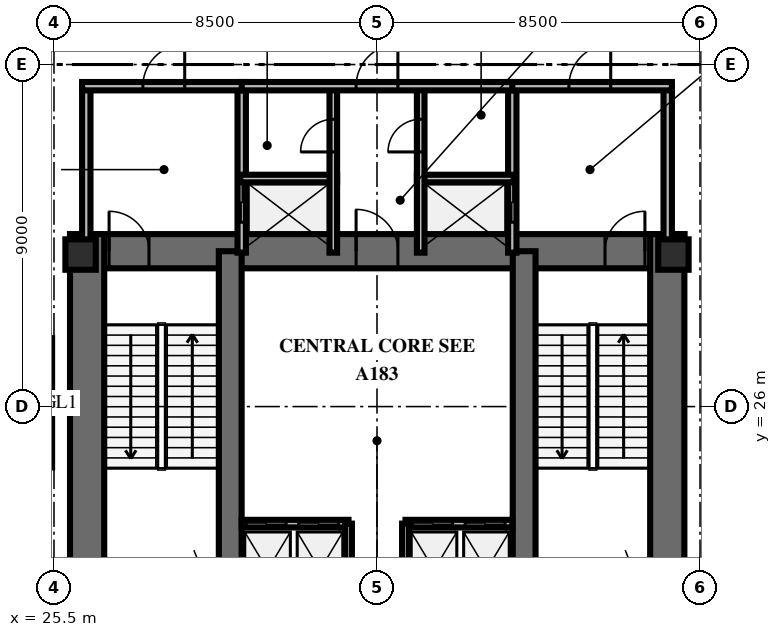
"""IFC4 building model, lengths in metres.
Left out: names, types, materials, properties, quantities, classifications, styles, units other than length and angle.
Written with IfcOpenShell. Run it as: python <this file> out.ifc"""

import sys

from ifc_helpers import new_model, si_unit, direction, frame, frame_2d, origin, origin_2d, place, context, subcontext, project, spatial, rectangle, extrude, element, fill, save


model = new_model("IFC4")
c1 = context("Model", 3, precision=1e-05, world=origin(), true_north=direction((0.0, 1.0)))
c2 = subcontext(c1, "Body", "Model", "MODEL_VIEW")
j1 = project(units=[si_unit("LENGTHUNIT", "METRE"), si_unit("PLANEANGLEUNIT", "RADIAN")], contexts=[c1])
p1 = place(None, origin())
s1 = spatial("IfcSite", under=j1, at=p1, CompositionType="ELEMENT")
p2 = place(p1, origin())
s2 = spatial("IfcBuilding", under=s1, at=p2, CompositionType="ELEMENT")
p3 = place(p2, frame((0.0, 0.0, -4.8)))
s3 = spatial("IfcBuildingStorey", under=s2, at=p3, CompositionType="ELEMENT", Elevation=-4.8)
p4 = place(p3, frame((25.922, 30.088, 0.0), z_axis=(0.0, 0.0, 1.0), x_axis=(1.0, 0.0, 0.0)))
e1 = element("IfcWall", 1, at=p4, inside=s3, PredefinedType="SHEAR", context=c2, shape_type="SweptSolid", body=[
    extrude(rectangle(XDim=16.166, YDim=0.9, at=frame_2d((8.083, 0.0))), origin(), (0.0, 0.0, 1.0), 4.8),
])
p5 = place(p4, frame((1.028, 0.0, 0.0)))
e2 = element("IfcOpeningElement", 2, at=p5, cuts=e1, PredefinedType="OPENING", context=c2, shape_type="SweptSolid", body=[
    extrude(rectangle(XDim=1.05, YDim=2.15, at=frame_2d((0.525, 1.075))), frame((0.0, 0.46, 0.0), z_axis=(0.0, -1.0, 0.0), x_axis=(1.0, 0.0, 0.0)), (0.0, 0.0, 1.0), 0.92),
])
p6 = place(p4, frame((14.078, 0.0, 0.0)))
e3 = element("IfcOpeningElement", 3, at=p6, cuts=e1, PredefinedType="OPENING", context=c2, shape_type="SweptSolid", body=[
    extrude(rectangle(XDim=1.05, YDim=2.15, at=frame_2d((0.525, 1.075))), frame((0.0, 0.46, 0.0), z_axis=(0.0, -1.0, 0.0), x_axis=(1.0, 0.0, 0.0)), (0.0, 0.0, 1.0), 0.92),
])
p7 = place(p4, frame((7.528, 0.0, 0.0)))
e4 = element("IfcOpeningElement", 4, at=p7, cuts=e1, PredefinedType="OPENING", context=c2, shape_type="SweptSolid", body=[
    extrude(rectangle(XDim=1.1, YDim=2.15, at=frame_2d((0.55, 1.075))), frame((0.0, 0.46, 0.0), z_axis=(0.0, -1.0, 0.0), x_axis=(1.0, 0.0, 0.0)), (0.0, 0.0, 1.0), 0.92),
])
for number, where, z_axis, x_axis in (
    (5, (26.372, 19.662, 0.0), (0.0, 0.0, 1.0), (0.0, 1.0, 0.0)),
    (6, (41.638, 19.662, 0.0), (0.0, 0.0, 1.0), (0.0, 1.0, 0.0)),
):
    element("IfcWall", number, at=place(p3, frame(where, z_axis=z_axis, x_axis=x_axis)), inside=s3, PredefinedType="SHEAR", context=c2, shape_type="SweptSolid", body=[
        extrude(rectangle(XDim=10.876, YDim=0.9, at=frame_2d((5.438, 0.0))), origin(), (0.0, 0.0, 1.0), 4.8),
    ])
for number, where, z_axis, x_axis in (
    (7, (30.138, 20.112, 0.0), (0.0, 0.0, 1.0), (0.0, 1.0, 0.0)),
    (8, (37.872, 20.112, 0.0), (0.0, 0.0, 1.0), (0.0, 1.0, 0.0)),
):
    element("IfcWall", number, at=place(p3, frame(where, z_axis=z_axis, x_axis=x_axis)), inside=s3, PredefinedType="SHEAR", context=c2, shape_type="SweptSolid", body=[
        extrude(rectangle(XDim=9.976, YDim=0.6, at=frame_2d((4.988, 0.0))), origin(), (0.0, 0.0, 1.0), 4.8),
    ])
for number, where, z_axis, x_axis in (
    (9, (26.2, 30.0, 0.0), (0.0, 0.0, 1.0), (1.0, 0.0, 0.0)),
    (10, (41.8, 30.0, 0.0), (0.0, 0.0, 1.0), (1.0, 0.0, 0.0)),
):
    element("IfcColumn", number, at=place(p3, frame(where, z_axis=z_axis, x_axis=x_axis)), inside=s3, PredefinedType="PILASTER", context=c2, shape_type="SweptSolid", body=[
        extrude(rectangle(XDim=0.8, YDim=0.8, at=origin_2d()), origin(), (0.0, 0.0, 1.0), 4.8),
    ])
p8 = place(p3, frame((26.35, 30.05, 0.0), z_axis=(0.0, 0.0, 1.0), x_axis=(0.0, 1.0, 0.0)))
e11 = element("IfcWall", 11, at=p8, inside=s3, PredefinedType="SOLIDWALL", context=c2, shape_type="SweptSolid", body=[
    extrude(rectangle(XDim=4.38, YDim=0.22, at=frame_2d((2.19, 0.0))), origin(), (0.0, 0.0, 1.0), 3.56),
])
p9 = place(p3, frame((30.44, 30.05, 0.0), z_axis=(0.0, 0.0, 1.0), x_axis=(0.0, 1.0, 0.0)))
e12 = element("IfcWall", 12, at=p9, inside=s3, PredefinedType="SOLIDWALL", context=c2, shape_type="SweptSolid", body=[
    extrude(rectangle(XDim=4.38, YDim=0.22, at=frame_2d((2.19, 0.0))), origin(), (0.0, 0.0, 1.0), 3.56),
])
p10 = place(p9, frame((0.8, 0.0, 0.0)))
e13 = element("IfcOpeningElement", 13, at=p10, cuts=e12, PredefinedType="OPENING", context=c2, shape_type="SweptSolid", body=[
    extrude(rectangle(XDim=1.05, YDim=2.1, at=frame_2d((0.525, 1.05))), frame((0.0, 0.12, 0.0), z_axis=(0.0, -1.0, 0.0), x_axis=(1.0, 0.0, 0.0)), (0.0, 0.0, 1.0), 0.24),
])
p11 = place(p3, frame((26.24, 34.43, 0.0), z_axis=(0.0, 0.0, 1.0), x_axis=(1.0, 0.0, 0.0)))
e14 = element("IfcWall", 14, at=p11, inside=s3, PredefinedType="SOLIDWALL", context=c2, shape_type="SweptSolid", body=[
    extrude(rectangle(XDim=4.31, YDim=0.22, at=frame_2d((2.155, 0.0))), origin(), (0.0, 0.0, 1.0), 3.56),
])
p12 = place(p11, frame((1.6, 0.0, 0.0)))
e15 = element("IfcOpeningElement", 15, at=p12, cuts=e14, PredefinedType="OPENING", context=c2, shape_type="SweptSolid", body=[
    extrude(rectangle(XDim=1.1, YDim=2.15, at=frame_2d((0.55, 1.075))), frame((0.0, 0.12, 0.0), z_axis=(0.0, -1.0, 0.0), x_axis=(1.0, 0.0, 0.0)), (0.0, 0.0, 1.0), 0.24),
])
p13 = place(p3, frame((30.4, 32.0, 0.0), z_axis=(0.0, 0.0, 1.0), x_axis=(1.0, 0.0, 0.0)))
e16 = element("IfcWall", 16, at=p13, inside=s3, PredefinedType="SOLIDWALL", context=c2, shape_type="SweptSolid", body=[
    extrude(rectangle(XDim=2.55, YDim=0.2, at=frame_2d((1.275, 0.0))), origin(), (0.0, 0.0, 1.0), 3.56),
])
p14 = place(p3, frame((32.85, 30.05, 0.0), z_axis=(0.0, 0.0, 1.0), x_axis=(0.0, 1.0, 0.0)))
e17 = element("IfcWall", 17, at=p14, inside=s3, PredefinedType="SOLIDWALL", context=c2, shape_type="SweptSolid", body=[
    extrude(rectangle(XDim=4.38, YDim=0.2, at=frame_2d((2.19, 0.0))), origin(), (0.0, 0.0, 1.0), 3.56),
])
p15 = place(p14, frame((2.65, 0.0, 0.0)))
e18 = element("IfcOpeningElement", 18, at=p15, cuts=e17, PredefinedType="OPENING", context=c2, shape_type="SweptSolid", body=[
    extrude(rectangle(XDim=0.86, YDim=2.05, at=frame_2d((0.43, 1.025))), frame((0.0, 0.11, 0.0), z_axis=(0.0, -1.0, 0.0), x_axis=(1.0, 0.0, 0.0)), (0.0, 0.0, 1.0), 0.22),
])
p16 = place(p3, frame((37.56, 30.05, 0.0), z_axis=(0.0, 0.0, 1.0), x_axis=(0.0, 1.0, 0.0)))
e19 = element("IfcWall", 19, at=p16, inside=s3, PredefinedType="SOLIDWALL", context=c2, shape_type="SweptSolid", body=[
    extrude(rectangle(XDim=4.38, YDim=0.22, at=frame_2d((2.19, 0.0))), origin(), (0.0, 0.0, 1.0), 3.56),
])
p17 = place(p16, frame((0.8, 0.0, 0.0)))
e20 = element("IfcOpeningElement", 20, at=p17, cuts=e19, PredefinedType="OPENING", context=c2, shape_type="SweptSolid", body=[
    extrude(rectangle(XDim=1.05, YDim=2.1, at=frame_2d((0.525, 1.05))), frame((0.0, 0.12, 0.0), z_axis=(0.0, -1.0, 0.0), x_axis=(1.0, 0.0, 0.0)), (0.0, 0.0, 1.0), 0.24),
])
p18 = place(p3, frame((41.65, 30.05, 0.0), z_axis=(0.0, 0.0, 1.0), x_axis=(0.0, 1.0, 0.0)))
e21 = element("IfcWall", 21, at=p18, inside=s3, PredefinedType="SOLIDWALL", context=c2, shape_type="SweptSolid", body=[
    extrude(rectangle(XDim=4.38, YDim=0.22, at=frame_2d((2.19, 0.0))), origin(), (0.0, 0.0, 1.0), 3.56),
])
p19 = place(p3, frame((37.45, 34.43, 0.0), z_axis=(0.0, 0.0, 1.0), x_axis=(1.0, 0.0, 0.0)))
e22 = element("IfcWall", 22, at=p19, inside=s3, PredefinedType="SOLIDWALL", context=c2, shape_type="SweptSolid", body=[
    extrude(rectangle(XDim=4.31, YDim=0.22, at=frame_2d((2.155, 0.0))), origin(), (0.0, 0.0, 1.0), 3.56),
])
p20 = place(p19, frame((1.6, 0.0, 0.0)))
e23 = element("IfcOpeningElement", 23, at=p20, cuts=e22, PredefinedType="OPENING", context=c2, shape_type="SweptSolid", body=[
    extrude(rectangle(XDim=1.1, YDim=2.15, at=frame_2d((0.55, 1.075))), frame((0.0, 0.12, 0.0), z_axis=(0.0, -1.0, 0.0), x_axis=(1.0, 0.0, 0.0)), (0.0, 0.0, 1.0), 0.24),
])
p21 = place(p3, frame((35.05, 32.0, 0.0), z_axis=(0.0, 0.0, 1.0), x_axis=(1.0, 0.0, 0.0)))
e24 = element("IfcWall", 24, at=p21, inside=s3, PredefinedType="SOLIDWALL", context=c2, shape_type="SweptSolid", body=[
    extrude(rectangle(XDim=2.55, YDim=0.2, at=frame_2d((1.275, 0.0))), origin(), (0.0, 0.0, 1.0), 3.56),
])
p22 = place(p3, frame((35.15, 30.05, 0.0), z_axis=(0.0, 0.0, 1.0), x_axis=(0.0, 1.0, 0.0)))
e25 = element("IfcWall", 25, at=p22, inside=s3, PredefinedType="SOLIDWALL", context=c2, shape_type="SweptSolid", body=[
    extrude(rectangle(XDim=4.38, YDim=0.2, at=frame_2d((2.19, 0.0))), origin(), (0.0, 0.0, 1.0), 3.56),
])
p23 = place(p22, frame((2.65, 0.0, 0.0)))
e26 = element("IfcOpeningElement", 26, at=p23, cuts=e25, PredefinedType="OPENING", context=c2, shape_type="SweptSolid", body=[
    extrude(rectangle(XDim=0.86, YDim=2.05, at=frame_2d((0.43, 1.025))), frame((0.0, 0.11, 0.0), z_axis=(0.0, -1.0, 0.0), x_axis=(1.0, 0.0, 0.0)), (0.0, 0.0, 1.0), 0.22),
])
p24 = place(p3, frame((30.44, 34.43, 0.0), z_axis=(0.0, 0.0, 1.0), x_axis=(1.0, 0.0, 0.0)))
e27 = element("IfcWall", 27, at=p24, inside=s3, PredefinedType="SOLIDWALL", context=c2, shape_type="SweptSolid", body=[
    extrude(rectangle(XDim=7.12, YDim=0.22, at=frame_2d((3.56, 0.0))), origin(), (0.0, 0.0, 1.0), 3.56),
])
p25 = place(p24, frame((3.01, 0.0, 0.0)))
e28 = element("IfcOpeningElement", 28, at=p25, cuts=e27, PredefinedType="OPENING", context=c2, shape_type="SweptSolid", body=[
    extrude(rectangle(XDim=1.1, YDim=2.15, at=frame_2d((0.55, 1.075))), frame((0.0, 0.12, 0.0), z_axis=(0.0, -1.0, 0.0), x_axis=(1.0, 0.0, 0.0)), (0.0, 0.0, 1.0), 0.24),
])
p26 = place(p3, frame((30.44, 22.92, 0.0), z_axis=(0.0, 0.0, 1.0), x_axis=(1.0, 0.0, 0.0)))
e29 = element("IfcWall", 29, at=p26, inside=s3, PredefinedType="SOLIDWALL", context=c2, shape_type="SweptSolid", body=[
    extrude(rectangle(XDim=2.81, YDim=0.2, at=frame_2d((1.405, 0.0))), origin(), (0.0, 0.0, 1.0), 3.56),
])
p27 = place(p26, frame((0.12, 0.0, 0.0)))
e30 = element("IfcOpeningElement", 30, at=p27, cuts=e29, PredefinedType="OPENING", context=c2, shape_type="SweptSolid", body=[
    extrude(rectangle(XDim=1.05, YDim=2.1, at=frame_2d((0.525, 1.05))), frame((0.0, 0.11, 0.0), z_axis=(0.0, -1.0, 0.0), x_axis=(1.0, 0.0, 0.0)), (0.0, 0.0, 1.0), 0.22),
])
p28 = place(p26, frame((1.5, 0.0, 0.0)))
e31 = element("IfcOpeningElement", 31, at=p28, cuts=e29, PredefinedType="OPENING", context=c2, shape_type="SweptSolid", body=[
    extrude(rectangle(XDim=1.05, YDim=2.1, at=frame_2d((0.525, 1.05))), frame((0.0, 0.11, 0.0), z_axis=(0.0, -1.0, 0.0), x_axis=(1.0, 0.0, 0.0)), (0.0, 0.0, 1.0), 0.22),
])
p29 = place(p3, frame((33.25, 20.5, 0.0), z_axis=(0.0, 0.0, 1.0), x_axis=(0.0, 1.0, 0.0)))
e32 = element("IfcWall", 32, at=p29, inside=s3, PredefinedType="SOLIDWALL", context=c2, shape_type="SweptSolid", body=[
    extrude(rectangle(XDim=2.42, YDim=0.18, at=frame_2d((1.21, 0.0))), origin(), (0.0, 0.0, 1.0), 3.56),
])
p30 = place(p3, frame((34.75, 22.92, 0.0), z_axis=(0.0, 0.0, 1.0), x_axis=(1.0, 0.0, 0.0)))
e33 = element("IfcWall", 33, at=p30, inside=s3, PredefinedType="SOLIDWALL", context=c2, shape_type="SweptSolid", body=[
    extrude(rectangle(XDim=2.81, YDim=0.2, at=frame_2d((1.405, 0.0))), origin(), (0.0, 0.0, 1.0), 3.56),
])
p31 = place(p30, frame((0.19, 0.0, 0.0)))
e34 = element("IfcOpeningElement", 34, at=p31, cuts=e33, PredefinedType="OPENING", context=c2, shape_type="SweptSolid", body=[
    extrude(rectangle(XDim=1.05, YDim=2.1, at=frame_2d((0.525, 1.05))), frame((0.0, 0.11, 0.0), z_axis=(0.0, -1.0, 0.0), x_axis=(1.0, 0.0, 0.0)), (0.0, 0.0, 1.0), 0.22),
])
p32 = place(p30, frame((1.57, 0.0, 0.0)))
e35 = element("IfcOpeningElement", 35, at=p32, cuts=e33, PredefinedType="OPENING", context=c2, shape_type="SweptSolid", body=[
    extrude(rectangle(XDim=1.05, YDim=2.1, at=frame_2d((0.525, 1.05))), frame((0.0, 0.11, 0.0), z_axis=(0.0, -1.0, 0.0), x_axis=(1.0, 0.0, 0.0)), (0.0, 0.0, 1.0), 0.22),
])
p33 = place(p3, frame((34.75, 20.5, 0.0), z_axis=(0.0, 0.0, 1.0), x_axis=(0.0, 1.0, 0.0)))
e36 = element("IfcWall", 36, at=p33, inside=s3, PredefinedType="SOLIDWALL", context=c2, shape_type="SweptSolid", body=[
    extrude(rectangle(XDim=2.42, YDim=0.18, at=frame_2d((1.21, 0.0))), origin(), (0.0, 0.0, 1.0), 3.56),
])
p34 = place(p5, origin())
e37 = element("IfcDoor", 37, at=p34, inside=s3, OperationType="SINGLE_SWING_LEFT", PredefinedType="DOOR", context=c2, shape_type="SweptSolid", body=[
    extrude(rectangle(XDim=1.05, YDim=2.15, at=frame_2d((0.525, 1.075))), frame((0.0, 0.025, 0.0), z_axis=(0.0, -1.0, 0.0), x_axis=(1.0, 0.0, 0.0)), (0.0, 0.0, 1.0), 0.05),
])
fill(e2, e37)
p35 = place(p6, origin())
e38 = element("IfcDoor", 38, at=p35, inside=s3, OperationType="SINGLE_SWING_RIGHT", PredefinedType="DOOR", context=c2, shape_type="SweptSolid", body=[
    extrude(rectangle(XDim=1.05, YDim=2.15, at=frame_2d((0.525, 1.075))), frame((0.0, 0.025, 0.0), z_axis=(0.0, -1.0, 0.0), x_axis=(1.0, 0.0, 0.0)), (0.0, 0.0, 1.0), 0.05),
])
fill(e3, e38)
p36 = place(p7, origin())
e39 = element("IfcDoor", 39, at=p36, inside=s3, OperationType="SINGLE_SWING_LEFT", PredefinedType="DOOR", context=c2, shape_type="SweptSolid", body=[
    extrude(rectangle(XDim=1.1, YDim=2.15, at=frame_2d((0.55, 1.075))), frame((0.0, 0.025, 0.0), z_axis=(0.0, -1.0, 0.0), x_axis=(1.0, 0.0, 0.0)), (0.0, 0.0, 1.0), 0.05),
])
fill(e4, e39)
p37 = place(p12, origin())
e40 = element("IfcDoor", 40, at=p37, inside=s3, OperationType="SINGLE_SWING_RIGHT", PredefinedType="DOOR", context=c2, shape_type="SweptSolid", body=[
    extrude(rectangle(XDim=1.1, YDim=2.15, at=frame_2d((0.55, 1.075))), frame((0.0, 0.025, 0.0), z_axis=(0.0, -1.0, 0.0), x_axis=(1.0, 0.0, 0.0)), (0.0, 0.0, 1.0), 0.05),
])
fill(e15, e40)
p38 = place(p10, origin())
e41 = element("IfcDoor", 41, at=p38, inside=s3, OperationType="DOUBLE_DOOR_SLIDING", PredefinedType="USERDEFINED", context=c2, shape_type="SweptSolid", body=[
    extrude(rectangle(XDim=1.05, YDim=2.1, at=frame_2d((0.525, 1.05))), frame((0.0, 0.025, 0.0), z_axis=(0.0, -1.0, 0.0), x_axis=(1.0, 0.0, 0.0)), (0.0, 0.0, 1.0), 0.05),
])
fill(e13, e41)
p39 = place(p15, origin())
e42 = element("IfcDoor", 42, at=p39, inside=s3, OperationType="SINGLE_SWING_LEFT", PredefinedType="TRAPDOOR", context=c2, shape_type="SweptSolid", body=[
    extrude(rectangle(XDim=0.86, YDim=2.05, at=frame_2d((0.43, 1.025))), frame((0.0, 0.025, 0.0), z_axis=(0.0, -1.0, 0.0), x_axis=(1.0, 0.0, 0.0)), (0.0, 0.0, 1.0), 0.05),
])
fill(e18, e42)
p40 = place(p20, origin())
e43 = element("IfcDoor", 43, at=p40, inside=s3, OperationType="SINGLE_SWING_RIGHT", PredefinedType="DOOR", context=c2, shape_type="SweptSolid", body=[
    extrude(rectangle(XDim=1.1, YDim=2.15, at=frame_2d((0.55, 1.075))), frame((0.0, 0.025, 0.0), z_axis=(0.0, -1.0, 0.0), x_axis=(1.0, 0.0, 0.0)), (0.0, 0.0, 1.0), 0.05),
])
fill(e23, e43)
p41 = place(p17, origin())
e44 = element("IfcDoor", 44, at=p41, inside=s3, OperationType="DOUBLE_DOOR_SLIDING", PredefinedType="USERDEFINED", context=c2, shape_type="SweptSolid", body=[
    extrude(rectangle(XDim=1.05, YDim=2.1, at=frame_2d((0.525, 1.05))), frame((0.0, 0.025, 0.0), z_axis=(0.0, -1.0, 0.0), x_axis=(1.0, 0.0, 0.0)), (0.0, 0.0, 1.0), 0.05),
])
fill(e20, e44)
p42 = place(p23, origin())
e45 = element("IfcDoor", 45, at=p42, inside=s3, OperationType="SINGLE_SWING_LEFT", PredefinedType="TRAPDOOR", context=c2, shape_type="SweptSolid", body=[
    extrude(rectangle(XDim=0.86, YDim=2.05, at=frame_2d((0.43, 1.025))), frame((0.0, 0.025, 0.0), z_axis=(0.0, -1.0, 0.0), x_axis=(1.0, 0.0, 0.0)), (0.0, 0.0, 1.0), 0.05),
])
fill(e26, e45)
p43 = place(p25, origin())
e46 = element("IfcDoor", 46, at=p43, inside=s3, OperationType="SINGLE_SWING_RIGHT", PredefinedType="DOOR", context=c2, shape_type="SweptSolid", body=[
    extrude(rectangle(XDim=1.1, YDim=2.15, at=frame_2d((0.55, 1.075))), frame((0.0, 0.025, 0.0), z_axis=(0.0, -1.0, 0.0), x_axis=(1.0, 0.0, 0.0)), (0.0, 0.0, 1.0), 0.05),
])
fill(e28, e46)
p44 = place(p27, origin())
e47 = element("IfcDoor", 47, at=p44, inside=s3, OperationType="DOUBLE_DOOR_SLIDING", PredefinedType="USERDEFINED", context=c2, shape_type="SweptSolid", body=[
    extrude(rectangle(XDim=1.05, YDim=2.1, at=frame_2d((0.525, 1.05))), frame((0.0, 0.025, 0.0), z_axis=(0.0, -1.0, 0.0), x_axis=(1.0, 0.0, 0.0)), (0.0, 0.0, 1.0), 0.05),
])
fill(e30, e47)
p45 = place(p28, origin())
e48 = element("IfcDoor", 48, at=p45, inside=s3, OperationType="DOUBLE_DOOR_SLIDING", PredefinedType="USERDEFINED", context=c2, shape_type="SweptSolid", body=[
    extrude(rectangle(XDim=1.05, YDim=2.1, at=frame_2d((0.525, 1.05))), frame((0.0, 0.025, 0.0), z_axis=(0.0, -1.0, 0.0), x_axis=(1.0, 0.0, 0.0)), (0.0, 0.0, 1.0), 0.05),
])
fill(e31, e48)
p46 = place(p31, origin())
e49 = element("IfcDoor", 49, at=p46, inside=s3, OperationType="DOUBLE_DOOR_SLIDING", PredefinedType="USERDEFINED", context=c2, shape_type="SweptSolid", body=[
    extrude(rectangle(XDim=1.05, YDim=2.1, at=frame_2d((0.525, 1.05))), frame((0.0, 0.025, 0.0), z_axis=(0.0, -1.0, 0.0), x_axis=(1.0, 0.0, 0.0)), (0.0, 0.0, 1.0), 0.05),
])
fill(e34, e49)
p47 = place(p32, origin())
e50 = element("IfcDoor", 50, at=p47, inside=s3, OperationType="DOUBLE_DOOR_SLIDING", PredefinedType="USERDEFINED", context=c2, shape_type="SweptSolid", body=[
    extrude(rectangle(XDim=1.05, YDim=2.1, at=frame_2d((0.525, 1.05))), frame((0.0, 0.025, 0.0), z_axis=(0.0, -1.0, 0.0), x_axis=(1.0, 0.0, 0.0)), (0.0, 0.0, 1.0), 0.05),
])
fill(e35, e50)
save(model, sys.argv[1])
